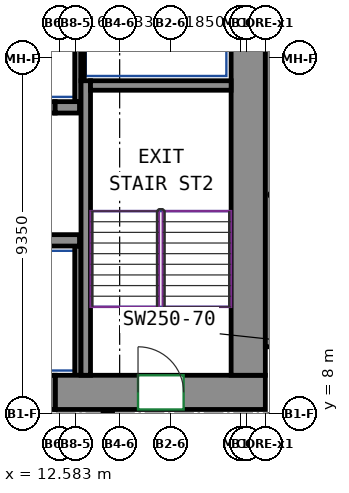
"""IFC4 building model, lengths in metres.
Left out: names, types, materials, properties, quantities, classifications, styles, units other than length and angle.
Written with IfcOpenShell. Run it as: python <this file> out.ifc"""

import sys

from ifc_helpers import new_model, si_unit, direction, frame, frame_2d, origin, place, context, subcontext, project, spatial, rectangle, extrude, source, transform, mapped, element, fill, save


model = new_model("IFC4")
c1 = context("Model", 3, precision=1e-05, world=origin(), true_north=direction((0.0, 1.0)))
c2 = subcontext(c1, "Body", "Model", "MODEL_VIEW")
j1 = project(units=[si_unit("LENGTHUNIT", "METRE"), si_unit("PLANEANGLEUNIT", "RADIAN")], contexts=[c1])
p1 = place(None, origin())
s1 = spatial("IfcSite", under=j1, at=p1, CompositionType="ELEMENT")
p2 = place(p1, origin())
s2 = spatial("IfcBuilding", under=s1, at=p2, CompositionType="ELEMENT")
p3 = place(p2, frame((0.0, 0.0, 175.3)))
s3 = spatial("IfcBuildingStorey", under=s2, at=p3, CompositionType="ELEMENT", Elevation=175.3)
m1 = source(origin(), c2, "Body", "SweptSolid", [
    extrude(rectangle(XDim=5.53, YDim=0.9, at=frame_2d((2.765, 0.0))), origin(), (0.0, 0.0, 1.0), 3.12),
])
p4 = place(p3, frame((12.47, 8.55, 0.0), z_axis=(0.0, 0.0, 1.0), x_axis=(1.0, 0.0, 0.0)))
e1 = element("IfcWall", 1, at=p4, inside=s3, PredefinedType="SHEAR", context=c2, shape_type="MappedRepresentation", body=[
    mapped(m1, transform((0.0, 0.0, 0.0))),
])
p5 = place(p4, frame((2.18, 0.0, 0.0)))
e2 = element("IfcOpeningElement", 2, at=p5, cuts=e1, PredefinedType="OPENING", context=c2, shape_type="SweptSolid", body=[
    extrude(rectangle(XDim=1.2, YDim=2.1, at=frame_2d((0.6, 1.05))), frame((0.0, 0.46, 0.0), z_axis=(0.0, -1.0, 0.0), x_axis=(1.0, 0.0, 0.0)), (0.0, 0.0, 1.0), 0.92),
])
m2 = source(origin(), c2, "Body", "SweptSolid", [
    extrude(rectangle(XDim=12.0, YDim=0.9, at=frame_2d((6.0, 0.0))), origin(), (0.0, 0.0, 1.0), 3.12),
])
p6 = place(p3, frame((17.55, 9.0, 0.0), z_axis=(0.0, 0.0, 1.0), x_axis=(0.0, 1.0, 0.0)))
e3 = element("IfcWall", 3, at=p6, inside=s3, PredefinedType="SHEAR", context=c2, shape_type="MappedRepresentation", body=[
    mapped(m2, transform((0.0, 0.0, 0.0))),
])
m3 = source(origin(), c2, "Body", "SweptSolid", [
    extrude(rectangle(XDim=7.75, YDim=0.25, at=frame_2d((3.875, 0.0))), origin(), (0.0, 0.0, 1.0), 3.12),
])
p7 = place(p3, frame((13.275, 9.0, 0.0), z_axis=(0.0, 0.0, 1.0), x_axis=(0.0, 1.0, 0.0)))
e4 = element("IfcWall", 4, at=p7, inside=s3, PredefinedType="SHEAR", context=c2, shape_type="MappedRepresentation", body=[
    mapped(m3, transform((0.0, 0.0, 0.0))),
])
m4 = source(origin(), c2, "Body", "SweptSolid", [
    extrude(rectangle(XDim=3.7, YDim=0.25, at=frame_2d((1.85, 0.0))), origin(), (0.0, 0.0, 1.0), 3.12),
])
p8 = place(p3, frame((13.4, 16.625, 0.0), z_axis=(0.0, 0.0, 1.0), x_axis=(1.0, 0.0, 0.0)))
e5 = element("IfcWall", 5, at=p8, inside=s3, PredefinedType="SHEAR", context=c2, shape_type="MappedRepresentation", body=[
    mapped(m4, transform((0.0, 0.0, 0.0))),
])
m5 = source(origin(), c2, "Body", "SweptSolid", [
    extrude(rectangle(XDim=8.0, YDim=0.35, at=frame_2d((4.0, 0.0))), origin(), (0.0, 0.0, 1.0), 3.12),
])
p9 = place(p3, frame((18.175, 9.75, 0.0), z_axis=(0.0, 0.0, 1.0), x_axis=(0.0, 1.0, 0.0)))
e6 = element("IfcWall", 6, at=p9, inside=s3, PredefinedType="SHEAR", context=c2, shape_type="MappedRepresentation", body=[
    mapped(m5, transform((0.0, 0.0, 0.0))),
])
m6 = source(origin(), c2, "Body", "SweptSolid", [
    extrude(rectangle(XDim=2.82, YDim=0.3, at=frame_2d((1.41, 0.0))), origin(), (0.0, 0.0, 1.0), 3.12),
])
p10 = place(p3, frame((10.29, 12.55, 0.0), z_axis=(0.0, 0.0, 1.0), x_axis=(1.0, 0.0, 0.0)))
e7 = element("IfcWall", 7, at=p10, inside=s3, PredefinedType="SHEAR", context=c2, shape_type="MappedRepresentation", body=[
    mapped(m6, transform((0.0, 0.0, 0.0))),
])
m7 = source(origin(), c2, "Body", "SweptSolid", [
    extrude(rectangle(XDim=0.64, YDim=0.3, at=frame_2d((0.32, 0.0))), origin(), (0.0, 0.0, 1.0), 3.12),
])
p11 = place(p3, frame((12.47, 16.05, 0.0), z_axis=(0.0, 0.0, 1.0), x_axis=(1.0, 0.0, 0.0)))
e8 = element("IfcWall", 8, at=p11, inside=s3, PredefinedType="SHEAR", context=c2, shape_type="MappedRepresentation", body=[
    mapped(m7, transform((0.0, 0.0, 0.0))),
])
m8 = source(origin(), c2, "Body", "SweptSolid", [
    extrude(rectangle(XDim=1.4, YDim=0.3, at=frame_2d((0.7, 0.0))), origin(), (0.0, 0.0, 1.0), 3.12),
])
p12 = place(p3, frame((11.07, 16.05, 0.0), z_axis=(0.0, 0.0, 1.0), x_axis=(1.0, 0.0, 0.0)))
e9 = element("IfcWall", 9, at=p12, inside=s3, PredefinedType="PARTITIONING", context=c2, shape_type="MappedRepresentation", body=[
    mapped(m8, transform((0.0, 0.0, 0.0))),
])
p13 = place(p12, frame((0.15, 0.0, 0.0)))
e10 = element("IfcOpeningElement", 10, at=p13, cuts=e9, PredefinedType="OPENING", context=c2, shape_type="SweptSolid", body=[
    extrude(rectangle(XDim=1.1, YDim=2.1, at=frame_2d((0.55, 1.05))), frame((0.0, 0.16, 0.0), z_axis=(0.0, -1.0, 0.0), x_axis=(1.0, 0.0, 0.0)), (0.0, 0.0, 1.0), 0.32),
])
m9 = source(origin(), c2, "Body", "SweptSolid", [
    extrude(rectangle(XDim=3.275, YDim=0.165, at=frame_2d((1.638, 0.0))), origin(), (0.0, 0.0, 1.0), 3.12),
])
p14 = place(p3, frame((13.067, 16.2, 0.0), z_axis=(0.0, 0.0, 1.0), x_axis=(0.0, 1.0, 0.0)))
e11 = element("IfcWall", 11, at=p14, inside=s3, PredefinedType="PARTITIONING", context=c2, shape_type="MappedRepresentation", body=[
    mapped(m9, transform((0.0, 0.0, 0.0))),
])
m10 = source(origin(), c2, "Body", "SweptSolid", [
    extrude(rectangle(XDim=2.725, YDim=0.085, at=frame_2d((1.363, 0.0))), origin(), (0.0, 0.0, 1.0), 3.12),
])
p15 = place(p3, frame((13.192, 16.75, 0.0), z_axis=(0.0, 0.0, 1.0), x_axis=(0.0, 1.0, 0.0)))
e12 = element("IfcWall", 12, at=p15, inside=s3, PredefinedType="PARTITIONING", context=c2, shape_type="MappedRepresentation", body=[
    mapped(m10, transform((0.0, 0.0, 0.0))),
])
m11 = source(origin(), c2, "Body", "SweptSolid", [
    extrude(rectangle(XDim=3.4, YDim=0.165, at=frame_2d((1.7, 0.0))), origin(), (0.0, 0.0, 1.0), 3.12),
])
p16 = place(p3, frame((13.067, 9.0, 0.0), z_axis=(0.0, 0.0, 1.0), x_axis=(0.0, 1.0, 0.0)))
e13 = element("IfcWall", 13, at=p16, inside=s3, PredefinedType="PARTITIONING", context=c2, shape_type="MappedRepresentation", body=[
    mapped(m11, transform((0.0, 0.0, 0.0))),
])
m12 = source(origin(), c2, "Body", "SweptSolid", [
    extrude(rectangle(XDim=1.4, YDim=0.9, at=frame_2d((0.7, 0.0))), origin(), (0.0, 0.0, 1.0), 2.7),
])
p17 = place(p3, frame((11.07, 8.55, 0.0), z_axis=(0.0, 0.0, 1.0), x_axis=(1.0, 0.0, 0.0)))
e14 = element("IfcWall", 14, at=p17, inside=s3, PredefinedType="PARTITIONING", context=c2, shape_type="MappedRepresentation", body=[
    mapped(m12, transform((0.0, 0.0, 0.0))),
])
p18 = place(p17, frame((0.25, 0.0, 0.0)))
e15 = element("IfcOpeningElement", 15, at=p18, cuts=e14, PredefinedType="OPENING", context=c2, shape_type="SweptSolid", body=[
    extrude(rectangle(XDim=0.9, YDim=2.1, at=frame_2d((0.45, 1.05))), frame((0.0, 0.46, 0.0), z_axis=(0.0, -1.0, 0.0), x_axis=(1.0, 0.0, 0.0)), (0.0, 0.0, 1.0), 0.92),
])
p19 = place(p5, origin())
e16 = element("IfcDoor", 16, at=p19, inside=s3, OperationType="DOUBLE_DOOR_SINGLE_SWING", PredefinedType="DOOR", context=c2, shape_type="SweptSolid", body=[
    extrude(rectangle(XDim=1.2, YDim=2.1, at=frame_2d((0.6, 1.05))), frame((0.0, 0.355, 0.0), z_axis=(0.0, -1.0, 0.0), x_axis=(1.0, 0.0, 0.0)), (0.0, 0.0, 1.0), 0.05),
])
fill(e2, e16)
save(model, sys.argv[1])
